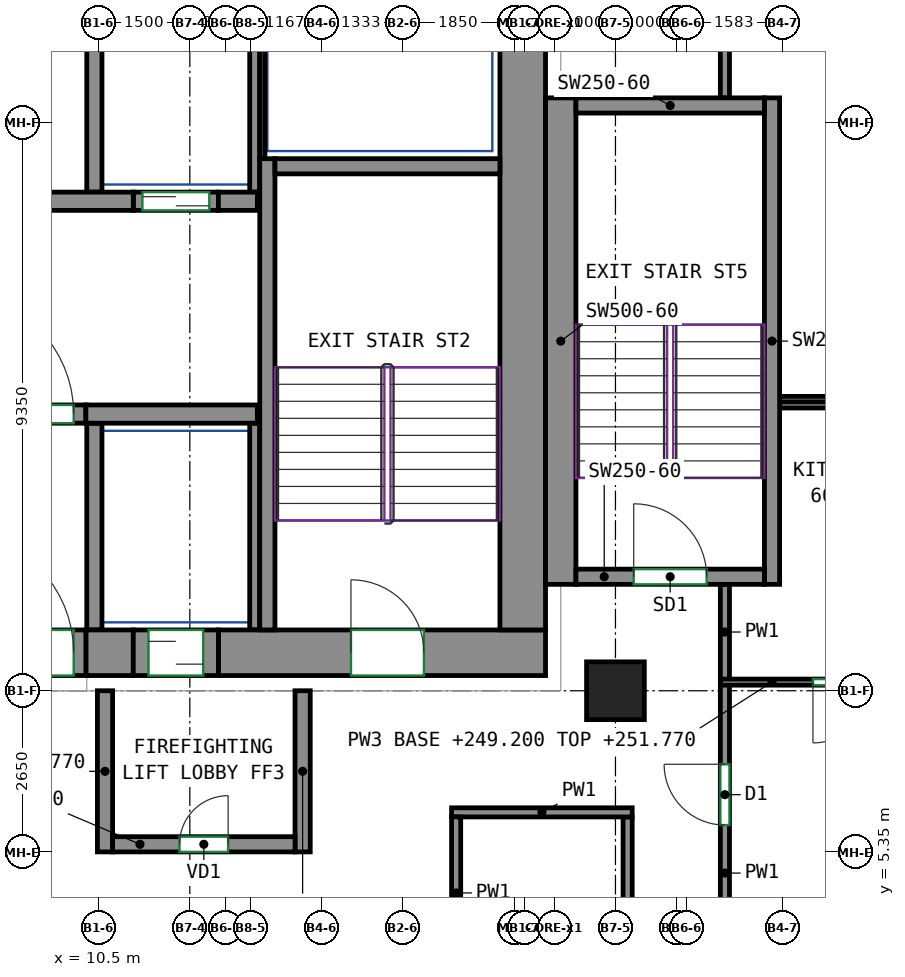
"""IFC4 building model, lengths in metres.
Left out: names, types, materials, properties, quantities, classifications, styles, units other than length and angle.
Written with IfcOpenShell. Run it as: python <this file> out.ifc"""

import sys

from ifc_helpers import new_model, si_unit, direction, frame, frame_2d, origin, origin_2d, place, context, subcontext, project, spatial, rectangle, extrude, source, transform, mapped, element, fill, save


model = new_model("IFC4")
c1 = context("Model", 3, precision=1e-05, world=origin(), true_north=direction((0.0, 1.0)))
c2 = subcontext(c1, "Body", "Model", "MODEL_VIEW")
j1 = project(units=[si_unit("LENGTHUNIT", "METRE"), si_unit("PLANEANGLEUNIT", "RADIAN")], contexts=[c1])
p1 = place(None, origin())
s1 = spatial("IfcSite", under=j1, at=p1, CompositionType="ELEMENT")
p2 = place(p1, origin())
s2 = spatial("IfcBuilding", under=s1, at=p2, CompositionType="ELEMENT")
p3 = place(p2, frame((0.0, 0.0, 249.2)))
s3 = spatial("IfcBuildingStorey", under=s2, at=p3, CompositionType="ELEMENT", Elevation=249.2)
m1 = source(origin(), c2, "Body", "SweptSolid", [
    extrude(rectangle(XDim=0.95, YDim=0.95, at=origin_2d()), origin(), (0.0, 0.0, 1.0), 3.12),
])
p4 = place(p3, frame((19.0, 8.0, 0.0), z_axis=(0.0, 0.0, 1.0), x_axis=(1.0, 0.0, 0.0)))
e1 = element("IfcColumn", 1, at=p4, inside=s3, PredefinedType="COLUMN", context=c2, shape_type="MappedRepresentation", body=[
    mapped(m1, transform((0.0, 0.0, 0.0))),
])
m2 = source(origin(), c2, "Body", "SweptSolid", [
    extrude(rectangle(XDim=0.78, YDim=0.75, at=frame_2d((0.39, 0.0))), origin(), (0.0, 0.0, 1.0), 3.12),
])
p5 = place(p3, frame((10.29, 8.625, 0.0), z_axis=(0.0, 0.0, 1.0), x_axis=(1.0, 0.0, 0.0)))
e2 = element("IfcWall", 2, at=p5, inside=s3, PredefinedType="SHEAR", context=c2, shape_type="MappedRepresentation", body=[
    mapped(m2, transform((0.0, 0.0, 0.0))),
])
m3 = source(origin(), c2, "Body", "SweptSolid", [
    extrude(rectangle(XDim=5.38, YDim=0.75, at=frame_2d((2.69, 0.0))), origin(), (0.0, 0.0, 1.0), 3.12),
])
p6 = place(p3, frame((12.47, 8.625, 0.0), z_axis=(0.0, 0.0, 1.0), x_axis=(1.0, 0.0, 0.0)))
e3 = element("IfcWall", 3, at=p6, inside=s3, PredefinedType="SHEAR", context=c2, shape_type="MappedRepresentation", body=[
    mapped(m3, transform((0.0, 0.0, 0.0))),
])
p7 = place(p6, frame((2.18, 0.0, 0.0)))
e4 = element("IfcOpeningElement", 4, at=p7, cuts=e3, PredefinedType="OPENING", context=c2, shape_type="SweptSolid", body=[
    extrude(rectangle(XDim=1.2, YDim=2.1, at=frame_2d((0.6, 1.05))), frame((0.0, 0.385, 0.0), z_axis=(0.0, -1.0, 0.0), x_axis=(1.0, 0.0, 0.0)), (0.0, 0.0, 1.0), 0.77),
])
m4 = source(origin(), c2, "Body", "SweptSolid", [
    extrude(rectangle(XDim=12.0, YDim=0.75, at=frame_2d((6.0, 0.0))), origin(), (0.0, 0.0, 1.0), 3.12),
])
p8 = place(p3, frame((17.475, 9.0, 0.0), z_axis=(0.0, 0.0, 1.0), x_axis=(0.0, 1.0, 0.0)))
e5 = element("IfcWall", 5, at=p8, inside=s3, PredefinedType="SHEAR", context=c2, shape_type="MappedRepresentation", body=[
    mapped(m4, transform((0.0, 0.0, 0.0))),
])
m5 = source(origin(), c2, "Body", "SweptSolid", [
    extrude(rectangle(XDim=7.75, YDim=0.25, at=frame_2d((3.875, 0.0))), origin(), (0.0, 0.0, 1.0), 3.12),
])
p9 = place(p3, frame((13.275, 9.0, 0.0), z_axis=(0.0, 0.0, 1.0), x_axis=(0.0, 1.0, 0.0)))
e6 = element("IfcWall", 6, at=p9, inside=s3, PredefinedType="SHEAR", context=c2, shape_type="MappedRepresentation", body=[
    mapped(m5, transform((0.0, 0.0, 0.0))),
])
m6 = source(origin(), c2, "Body", "SweptSolid", [
    extrude(rectangle(XDim=3.7, YDim=0.25, at=frame_2d((1.85, 0.0))), origin(), (0.0, 0.0, 1.0), 3.12),
])
p10 = place(p3, frame((13.4, 16.625, 0.0), z_axis=(0.0, 0.0, 1.0), x_axis=(1.0, 0.0, 0.0)))
e7 = element("IfcWall", 7, at=p10, inside=s3, PredefinedType="SHEAR", context=c2, shape_type="MappedRepresentation", body=[
    mapped(m6, transform((0.0, 0.0, 0.0))),
])
m7 = source(origin(), c2, "Body", "SweptSolid", [
    extrude(rectangle(XDim=8.0, YDim=0.5, at=frame_2d((4.0, 0.0))), origin(), (0.0, 0.0, 1.0), 3.12),
])
p11 = place(p3, frame((18.1, 9.75, 0.0), z_axis=(0.0, 0.0, 1.0), x_axis=(0.0, 1.0, 0.0)))
e8 = element("IfcWall", 8, at=p11, inside=s3, PredefinedType="SHEAR", context=c2, shape_type="MappedRepresentation", body=[
    mapped(m7, transform((0.0, 0.0, 0.0))),
])
m8 = source(origin(), c2, "Body", "SweptSolid", [
    extrude(rectangle(XDim=8.0, YDim=0.25, at=frame_2d((4.0, 0.0))), origin(), (0.0, 0.0, 1.0), 3.12),
])
p12 = place(p3, frame((21.575, 9.75, 0.0), z_axis=(0.0, 0.0, 1.0), x_axis=(0.0, 1.0, 0.0)))
e9 = element("IfcWall", 9, at=p12, inside=s3, PredefinedType="SHEAR", context=c2, shape_type="MappedRepresentation", body=[
    mapped(m8, transform((0.0, 0.0, 0.0))),
])
m9 = source(origin(), c2, "Body", "SweptSolid", [
    extrude(rectangle(XDim=3.1, YDim=0.25, at=frame_2d((1.55, 0.0))), origin(), (0.0, 0.0, 1.0), 3.12),
])
p13 = place(p3, frame((18.35, 9.875, 0.0), z_axis=(0.0, 0.0, 1.0), x_axis=(1.0, 0.0, 0.0)))
e10 = element("IfcWall", 10, at=p13, inside=s3, PredefinedType="SHEAR", context=c2, shape_type="MappedRepresentation", body=[
    mapped(m9, transform((0.0, 0.0, 0.0))),
])
p14 = place(p13, frame((0.95, 0.0, 0.0)))
e11 = element("IfcOpeningElement", 11, at=p14, cuts=e10, PredefinedType="OPENING", context=c2, shape_type="SweptSolid", body=[
    extrude(rectangle(XDim=1.2, YDim=2.1, at=frame_2d((0.6, 1.05))), frame((0.0, 0.135, 0.0), z_axis=(0.0, -1.0, 0.0), x_axis=(1.0, 0.0, 0.0)), (0.0, 0.0, 1.0), 0.27),
])
p15 = place(p3, frame((18.35, 17.625, 0.0), z_axis=(0.0, 0.0, 1.0), x_axis=(1.0, 0.0, 0.0)))
e12 = element("IfcWall", 12, at=p15, inside=s3, PredefinedType="SHEAR", context=c2, shape_type="MappedRepresentation", body=[
    mapped(m9, transform((0.0, 0.0, 0.0))),
])
m10 = source(origin(), c2, "Body", "SweptSolid", [
    extrude(rectangle(XDim=2.82, YDim=0.3, at=frame_2d((1.41, 0.0))), origin(), (0.0, 0.0, 1.0), 3.12),
])
p16 = place(p3, frame((10.29, 12.55, 0.0), z_axis=(0.0, 0.0, 1.0), x_axis=(1.0, 0.0, 0.0)))
e13 = element("IfcWall", 13, at=p16, inside=s3, PredefinedType="SHEAR", context=c2, shape_type="MappedRepresentation", body=[
    mapped(m10, transform((0.0, 0.0, 0.0))),
])
m11 = source(origin(), c2, "Body", "SweptSolid", [
    extrude(rectangle(XDim=22.08, YDim=0.3, at=frame_2d((11.04, 0.0))), origin(), (0.0, 0.0, 1.0), 3.12),
])
p17 = place(p3, frame((-11.01, 16.05, 0.0), z_axis=(0.0, 0.0, 1.0), x_axis=(1.0, 0.0, 0.0)))
e14 = element("IfcWall", 14, at=p17, inside=s3, PredefinedType="SHEAR", context=c2, shape_type="MappedRepresentation", body=[
    mapped(m11, transform((0.0, 0.0, 0.0))),
])
m12 = source(origin(), c2, "Body", "SweptSolid", [
    extrude(rectangle(XDim=0.64, YDim=0.3, at=frame_2d((0.32, 0.0))), origin(), (0.0, 0.0, 1.0), 3.12),
])
p18 = place(p3, frame((12.47, 16.05, 0.0), z_axis=(0.0, 0.0, 1.0), x_axis=(1.0, 0.0, 0.0)))
e15 = element("IfcWall", 15, at=p18, inside=s3, PredefinedType="SHEAR", context=c2, shape_type="MappedRepresentation", body=[
    mapped(m12, transform((0.0, 0.0, 0.0))),
])
m13 = source(origin(), c2, "Body", "SweptSolid", [
    extrude(rectangle(XDim=1.4, YDim=0.3, at=frame_2d((0.7, 0.0))), origin(), (0.0, 0.0, 1.0), 3.12),
])
p19 = place(p3, frame((11.07, 16.05, 0.0), z_axis=(0.0, 0.0, 1.0), x_axis=(1.0, 0.0, 0.0)))
e16 = element("IfcWall", 16, at=p19, inside=s3, PredefinedType="PARTITIONING", context=c2, shape_type="MappedRepresentation", body=[
    mapped(m13, transform((0.0, 0.0, 0.0))),
])
p20 = place(p19, frame((0.15, 0.0, 0.0)))
e17 = element("IfcOpeningElement", 17, at=p20, cuts=e16, PredefinedType="OPENING", context=c2, shape_type="SweptSolid", body=[
    extrude(rectangle(XDim=1.1, YDim=2.1, at=frame_2d((0.55, 1.05))), frame((0.0, 0.16, 0.0), z_axis=(0.0, -1.0, 0.0), x_axis=(1.0, 0.0, 0.0)), (0.0, 0.0, 1.0), 0.32),
])
m14 = source(origin(), c2, "Body", "SweptSolid", [
    extrude(rectangle(XDim=2.4, YDim=0.3, at=frame_2d((1.2, 0.0))), origin(), (0.0, 0.0, 1.0), 3.12),
])
p21 = place(p3, frame((7.89, 12.55, 0.0), z_axis=(0.0, 0.0, 1.0), x_axis=(1.0, 0.0, 0.0)))
e18 = element("IfcWall", 18, at=p21, inside=s3, PredefinedType="PARTITIONING", context=c2, shape_type="MappedRepresentation", body=[
    mapped(m14, transform((0.0, 0.0, 0.0))),
])
p22 = place(p21, frame((0.2, 0.0, 0.0)))
e19 = element("IfcOpeningElement", 19, at=p22, cuts=e18, PredefinedType="OPENING", context=c2, shape_type="SweptSolid", body=[
    extrude(rectangle(XDim=2.0, YDim=2.1, at=frame_2d((1.0, 1.05))), frame((0.0, 0.16, 0.0), z_axis=(0.0, -1.0, 0.0), x_axis=(1.0, 0.0, 0.0)), (0.0, 0.0, 1.0), 0.32),
])
m15 = source(origin(), c2, "Body", "SweptSolid", [
    extrude(rectangle(XDim=2.65, YDim=0.25, at=frame_2d((1.325, 0.0))), origin(), (0.0, 0.0, 1.0), 2.57),
])
for number, where, z_axis, x_axis in (
    (20, (10.605, 5.35, 0.0), (0.0, 0.0, 1.0), (0.0, 1.0, 0.0)),
    (21, (13.855, 5.35, 0.0), (0.0, 0.0, 1.0), (0.0, 1.0, 0.0)),
):
    element("IfcWall", number, at=place(p3, frame(where, z_axis=z_axis, x_axis=x_axis)), inside=s3, PredefinedType="PARTITIONING", context=c2, shape_type="MappedRepresentation", body=[
        mapped(m15, transform((0.0, 0.0, 0.0))),
    ])
m16 = source(origin(), c2, "Body", "SweptSolid", [
    extrude(rectangle(XDim=3.0, YDim=0.25, at=frame_2d((1.5, 0.0))), origin(), (0.0, 0.0, 1.0), 3.12),
])
p23 = place(p3, frame((10.73, 5.475, 0.0), z_axis=(0.0, 0.0, 1.0), x_axis=(1.0, 0.0, 0.0)))
e22 = element("IfcWall", 22, at=p23, inside=s3, PredefinedType="PARTITIONING", context=c2, shape_type="MappedRepresentation", body=[
    mapped(m16, transform((0.0, 0.0, 0.0))),
])
p24 = place(p23, frame((1.1, 0.0, 0.0)))
e23 = element("IfcOpeningElement", 23, at=p24, cuts=e22, PredefinedType="OPENING", context=c2, shape_type="SweptSolid", body=[
    extrude(rectangle(XDim=0.8, YDim=2.0, at=frame_2d((0.4, 1.0))), frame((0.0, 0.135, 0.0), z_axis=(0.0, -1.0, 0.0), x_axis=(1.0, 0.0, 0.0)), (0.0, 0.0, 1.0), 0.27),
])
m17 = source(origin(), c2, "Body", "SweptSolid", [
    extrude(rectangle(XDim=3.275, YDim=0.165, at=frame_2d((1.638, 0.0))), origin(), (0.0, 0.0, 1.0), 3.12),
])
p25 = place(p3, frame((13.067, 16.2, 0.0), z_axis=(0.0, 0.0, 1.0), x_axis=(0.0, 1.0, 0.0)))
e24 = element("IfcWall", 24, at=p25, inside=s3, PredefinedType="PARTITIONING", context=c2, shape_type="MappedRepresentation", body=[
    mapped(m17, transform((0.0, 0.0, 0.0))),
])
m18 = source(origin(), c2, "Body", "SweptSolid", [
    extrude(rectangle(XDim=3.275, YDim=0.25, at=frame_2d((1.638, 0.0))), origin(), (0.0, 0.0, 1.0), 3.12),
])
p26 = place(p3, frame((10.43, 16.2, 0.0), z_axis=(0.0, 0.0, 1.0), x_axis=(0.0, 1.0, 0.0)))
e25 = element("IfcWall", 25, at=p26, inside=s3, PredefinedType="PARTITIONING", context=c2, shape_type="MappedRepresentation", body=[
    mapped(m18, transform((0.0, 0.0, 0.0))),
])
m19 = source(origin(), c2, "Body", "SweptSolid", [
    extrude(rectangle(XDim=2.725, YDim=0.085, at=frame_2d((1.363, 0.0))), origin(), (0.0, 0.0, 1.0), 3.12),
])
p27 = place(p3, frame((13.192, 16.75, 0.0), z_axis=(0.0, 0.0, 1.0), x_axis=(0.0, 1.0, 0.0)))
e26 = element("IfcWall", 26, at=p27, inside=s3, PredefinedType="PARTITIONING", context=c2, shape_type="MappedRepresentation", body=[
    mapped(m19, transform((0.0, 0.0, 0.0))),
])
m20 = source(origin(), c2, "Body", "SweptSolid", [
    extrude(rectangle(XDim=3.4, YDim=0.25, at=frame_2d((1.7, 0.0))), origin(), (0.0, 0.0, 1.0), 3.12),
])
p28 = place(p3, frame((10.43, 9.0, 0.0), z_axis=(0.0, 0.0, 1.0), x_axis=(0.0, 1.0, 0.0)))
e27 = element("IfcWall", 27, at=p28, inside=s3, PredefinedType="PARTITIONING", context=c2, shape_type="MappedRepresentation", body=[
    mapped(m20, transform((0.0, 0.0, 0.0))),
])
m21 = source(origin(), c2, "Body", "SweptSolid", [
    extrude(rectangle(XDim=3.4, YDim=0.165, at=frame_2d((1.7, 0.0))), origin(), (0.0, 0.0, 1.0), 3.12),
])
p29 = place(p3, frame((13.067, 9.0, 0.0), z_axis=(0.0, 0.0, 1.0), x_axis=(0.0, 1.0, 0.0)))
e28 = element("IfcWall", 28, at=p29, inside=s3, PredefinedType="PARTITIONING", context=c2, shape_type="MappedRepresentation", body=[
    mapped(m21, transform((0.0, 0.0, 0.0))),
])
m22 = source(origin(), c2, "Body", "SweptSolid", [
    extrude(rectangle(XDim=2.4, YDim=0.75, at=frame_2d((1.2, 0.0))), origin(), (0.0, 0.0, 1.0), 2.7),
])
p30 = place(p3, frame((7.89, 8.625, 0.0), z_axis=(0.0, 0.0, 1.0), x_axis=(1.0, 0.0, 0.0)))
e29 = element("IfcWall", 29, at=p30, inside=s3, PredefinedType="PARTITIONING", context=c2, shape_type="MappedRepresentation", body=[
    mapped(m22, transform((0.0, 0.0, 0.0))),
])
p31 = place(p30, frame((0.2, 0.0, 0.0)))
e30 = element("IfcOpeningElement", 30, at=p31, cuts=e29, PredefinedType="OPENING", context=c2, shape_type="SweptSolid", body=[
    extrude(rectangle(XDim=2.0, YDim=2.1, at=frame_2d((1.0, 1.05))), frame((0.0, 0.385, 0.0), z_axis=(0.0, -1.0, 0.0), x_axis=(1.0, 0.0, 0.0)), (0.0, 0.0, 1.0), 0.77),
])
m23 = source(origin(), c2, "Body", "SweptSolid", [
    extrude(rectangle(XDim=1.4, YDim=0.75, at=frame_2d((0.7, 0.0))), origin(), (0.0, 0.0, 1.0), 2.7),
])
p32 = place(p3, frame((11.07, 8.625, 0.0), z_axis=(0.0, 0.0, 1.0), x_axis=(1.0, 0.0, 0.0)))
e31 = element("IfcWall", 31, at=p32, inside=s3, PredefinedType="PARTITIONING", context=c2, shape_type="MappedRepresentation", body=[
    mapped(m23, transform((0.0, 0.0, 0.0))),
])
p33 = place(p32, frame((0.25, 0.0, 0.0)))
e32 = element("IfcOpeningElement", 32, at=p33, cuts=e31, PredefinedType="OPENING", context=c2, shape_type="SweptSolid", body=[
    extrude(rectangle(XDim=0.9, YDim=2.1, at=frame_2d((0.45, 1.05))), frame((0.0, 0.385, 0.0), z_axis=(0.0, -1.0, 0.0), x_axis=(1.0, 0.0, 0.0)), (0.0, 0.0, 1.0), 0.77),
])
p34 = place(p3, frame((20.8, 17.75, 0.0), z_axis=(0.0, 0.0, 1.0), x_axis=(0.0, 1.0, 0.0)))
e33 = element("IfcWall", 33, at=p34, inside=s3, PredefinedType="PARTITIONING", context=c2, shape_type="SweptSolid", body=[
    extrude(rectangle(XDim=4.16, YDim=0.15, at=frame_2d((2.08, 0.0))), origin(), (0.0, 0.0, 1.0), 3.12),
])
p35 = place(p3, frame((20.8, 3.673, 0.0), z_axis=(0.0, 0.0, 1.0), x_axis=(0.0, 1.0, 0.0)))
e34 = element("IfcWall", 34, at=p35, inside=s3, PredefinedType="PARTITIONING", context=c2, shape_type="SweptSolid", body=[
    extrude(rectangle(XDim=4.429, YDim=0.15, at=frame_2d((2.214, 0.0))), origin(), (0.0, 0.0, 1.0), 3.12),
])
p36 = place(p35, frame((2.118, 0.0, 0.0)))
e35 = element("IfcOpeningElement", 35, at=p36, cuts=e34, PredefinedType="OPENING", context=c2, shape_type="SweptSolid", body=[
    extrude(rectangle(XDim=1.0, YDim=2.1, at=frame_2d((0.5, 1.05))), frame((0.0, 0.085, 0.0), z_axis=(0.0, -1.0, 0.0), x_axis=(1.0, 0.0, 0.0)), (0.0, 0.0, 1.0), 0.17),
])
p37 = place(p3, frame((20.8, 8.182, 0.0), z_axis=(0.0, 0.0, 1.0), x_axis=(0.0, 1.0, 0.0)))
e36 = element("IfcWall", 36, at=p37, inside=s3, PredefinedType="PARTITIONING", context=c2, shape_type="SweptSolid", body=[
    extrude(rectangle(XDim=1.568, YDim=0.15, at=frame_2d((0.784, 0.0))), origin(), (0.0, 0.0, 1.0), 3.12),
])
p38 = place(p3, frame((19.2, -0.358, 0.0), z_axis=(0.0, 0.0, 1.0), x_axis=(0.0, 1.0, 0.0)))
e37 = element("IfcWall", 37, at=p38, inside=s3, PredefinedType="PARTITIONING", context=c2, shape_type="SweptSolid", body=[
    extrude(rectangle(XDim=6.283, YDim=0.15, at=frame_2d((3.142, 0.0))), origin(), (0.0, 0.0, 1.0), 2.57),
])
p39 = place(p38, frame((0.81, 0.0, 0.0)))
e38 = element("IfcOpeningElement", 38, at=p39, cuts=e37, PredefinedType="OPENING", context=c2, shape_type="SweptSolid", body=[
    extrude(rectangle(XDim=0.9, YDim=2.1, at=frame_2d((0.45, 1.05))), frame((0.0, 0.085, 0.0), z_axis=(0.0, -1.0, 0.0), x_axis=(1.0, 0.0, 0.0)), (0.0, 0.0, 1.0), 0.17),
])
p40 = place(p3, frame((16.305, 6.0, 0.0), z_axis=(0.0, 0.0, 1.0), x_axis=(1.0, 0.0, 0.0)))
e39 = element("IfcWall", 39, at=p40, inside=s3, PredefinedType="PARTITIONING", context=c2, shape_type="SweptSolid", body=[
    extrude(rectangle(XDim=2.97, YDim=0.15, at=frame_2d((1.485, 0.0))), origin(), (0.0, 0.0, 1.0), 3.12),
])
p41 = place(p3, frame((16.38, 3.425, 0.0), z_axis=(0.0, 0.0, 1.0), x_axis=(0.0, 1.0, 0.0)))
e40 = element("IfcWall", 40, at=p41, inside=s3, PredefinedType="PARTITIONING", context=c2, shape_type="SweptSolid", body=[
    extrude(rectangle(XDim=2.5, YDim=0.15, at=frame_2d((1.25, 0.0))), origin(), (0.0, 0.0, 1.0), 3.12),
])
p42 = place(p3, frame((21.7, 12.791, 0.0), z_axis=(0.0, 0.0, 1.0), x_axis=(1.0, 0.0, 0.0)))
e41 = element("IfcWall", 41, at=p42, inside=s3, PredefinedType="PARTITIONING", context=c2, shape_type="SweptSolid", body=[
    extrude(rectangle(XDim=6.461, YDim=0.1, at=frame_2d((3.23, 0.0))), origin(), (0.0, 0.0, 1.0), 3.12),
])
p43 = place(p42, frame((4.356, 0.0, 0.0)))
e42 = element("IfcOpeningElement", 42, at=p43, cuts=e41, PredefinedType="OPENING", context=c2, shape_type="SweptSolid", body=[
    extrude(rectangle(XDim=0.9, YDim=2.1, at=frame_2d((0.45, 1.05))), frame((0.0, 0.06, 0.0), z_axis=(0.0, -1.0, 0.0), x_axis=(1.0, 0.0, 0.0)), (0.0, 0.0, 1.0), 0.12),
])
p44 = place(p3, frame((23.55, 8.142, 0.0), z_axis=(0.0, 0.0, 1.0), x_axis=(-1.0, 0.0, 0.0)))
e43 = element("IfcWall", 43, at=p44, inside=s3, PredefinedType="PARTITIONING", context=c2, shape_type="SweptSolid", body=[
    extrude(rectangle(XDim=2.823, YDim=0.1, at=frame_2d((1.412, 0.0))), origin(), (0.0, 0.0, 1.0), 2.57),
])
p45 = place(p44, frame((0.302, 0.0, 0.0)))
e44 = element("IfcOpeningElement", 44, at=p45, cuts=e43, PredefinedType="OPENING", context=c2, shape_type="SweptSolid", body=[
    extrude(rectangle(XDim=1.0, YDim=2.1, at=frame_2d((0.5, 1.05))), frame((0.0, 0.06, 0.0), z_axis=(0.0, -1.0, 0.0), x_axis=(1.0, 0.0, 0.0)), (0.0, 0.0, 1.0), 0.12),
])
p46 = place(p3, frame((23.55, 12.7, 0.0), z_axis=(0.0, 0.0, 1.0), x_axis=(-1.0, 0.0, 0.0)))
e45 = element("IfcWall", 45, at=p46, inside=s3, PredefinedType="PARTITIONING", context=c2, shape_type="SweptSolid", body=[
    extrude(rectangle(XDim=1.85, YDim=0.1, at=frame_2d((0.925, 0.0))), origin(), (0.0, 0.0, 1.0), 3.12),
])
p47 = place(p22, origin())
e46 = element("IfcDoor", 46, at=p47, inside=s3, OperationType="DOUBLE_DOOR_SINGLE_SWING", PredefinedType="DOOR", context=c2, shape_type="SweptSolid", body=[
    extrude(rectangle(XDim=2.0, YDim=2.1, at=frame_2d((1.0, 1.05))), frame((0.0, 0.025, 0.0), z_axis=(0.0, -1.0, 0.0), x_axis=(1.0, 0.0, 0.0)), (0.0, 0.0, 1.0), 0.05),
])
fill(e19, e46)
p48 = place(p31, origin())
e47 = element("IfcDoor", 47, at=p48, inside=s3, OperationType="DOUBLE_DOOR_SINGLE_SWING", PredefinedType="DOOR", context=c2, shape_type="SweptSolid", body=[
    extrude(rectangle(XDim=2.0, YDim=2.1, at=frame_2d((1.0, 1.05))), frame((0.0, 0.28, 0.0), z_axis=(0.0, -1.0, 0.0), x_axis=(1.0, 0.0, 0.0)), (0.0, 0.0, 1.0), 0.05),
])
fill(e30, e47)
p49 = place(p24, origin())
e48 = element("IfcDoor", 48, at=p49, inside=s3, OperationType="SINGLE_SWING_RIGHT", PredefinedType="DOOR", context=c2, shape_type="SweptSolid", body=[
    extrude(rectangle(XDim=0.8, YDim=2.0, at=frame_2d((0.4, 1.0))), frame((0.0, 0.025, 0.0), z_axis=(0.0, -1.0, 0.0), x_axis=(1.0, 0.0, 0.0)), (0.0, 0.0, 1.0), 0.05),
])
fill(e23, e48)
p50 = place(p33, origin())
e49 = element("IfcDoor", 49, at=p50, inside=s3, OperationType="SLIDING_TO_LEFT", PredefinedType="DOOR", context=c2, shape_type="SweptSolid", body=[
    extrude(rectangle(XDim=0.9, YDim=2.1, at=frame_2d((0.45, 1.05))), frame((0.0, 0.28, 0.0), z_axis=(0.0, -1.0, 0.0), x_axis=(1.0, 0.0, 0.0)), (0.0, 0.0, 1.0), 0.05),
])
fill(e32, e49)
p51 = place(p20, origin())
e50 = element("IfcDoor", 50, at=p51, inside=s3, OperationType="DOUBLE_DOOR_SLIDING", PredefinedType="DOOR", context=c2, shape_type="SweptSolid", body=[
    extrude(rectangle(XDim=1.1, YDim=2.1, at=frame_2d((0.55, 1.05))), frame((0.0, 0.025, 0.0), z_axis=(0.0, -1.0, 0.0), x_axis=(1.0, 0.0, 0.0)), (0.0, 0.0, 1.0), 0.05),
])
fill(e17, e50)
p52 = place(p7, origin())
e51 = element("IfcDoor", 51, at=p52, inside=s3, OperationType="DOUBLE_DOOR_SINGLE_SWING", PredefinedType="DOOR", context=c2, shape_type="SweptSolid", body=[
    extrude(rectangle(XDim=1.2, YDim=2.1, at=frame_2d((0.6, 1.05))), frame((0.0, 0.28, 0.0), z_axis=(0.0, -1.0, 0.0), x_axis=(1.0, 0.0, 0.0)), (0.0, 0.0, 1.0), 0.05),
])
fill(e4, e51)
p53 = place(p14, origin())
e52 = element("IfcDoor", 52, at=p53, inside=s3, OperationType="DOUBLE_DOOR_SINGLE_SWING", PredefinedType="DOOR", context=c2, shape_type="SweptSolid", body=[
    extrude(rectangle(XDim=1.2, YDim=2.1, at=frame_2d((0.6, 1.05))), frame((0.0, 0.025, 0.0), z_axis=(0.0, -1.0, 0.0), x_axis=(1.0, 0.0, 0.0)), (0.0, 0.0, 1.0), 0.05),
])
fill(e11, e52)
p54 = place(p36, origin())
e53 = element("IfcDoor", 53, at=p54, inside=s3, OperationType="SINGLE_SWING_RIGHT", PredefinedType="DOOR", context=c2, shape_type="SweptSolid", body=[
    extrude(rectangle(XDim=1.0, YDim=2.1, at=frame_2d((0.5, 1.05))), frame((0.0, 0.025, 0.0), z_axis=(0.0, -1.0, 0.0), x_axis=(1.0, 0.0, 0.0)), (0.0, 0.0, 1.0), 0.05),
])
fill(e35, e53)
p55 = place(p45, origin())
e54 = element("IfcDoor", 54, at=p55, inside=s3, OperationType="SINGLE_SWING_RIGHT", PredefinedType="DOOR", context=c2, shape_type="SweptSolid", body=[
    extrude(rectangle(XDim=1.0, YDim=2.1, at=frame_2d((0.5, 1.05))), frame((0.0, 0.025, 0.0), z_axis=(0.0, -1.0, 0.0), x_axis=(1.0, 0.0, 0.0)), (0.0, 0.0, 1.0), 0.05),
])
fill(e44, e54)
save(model, sys.argv[1])
